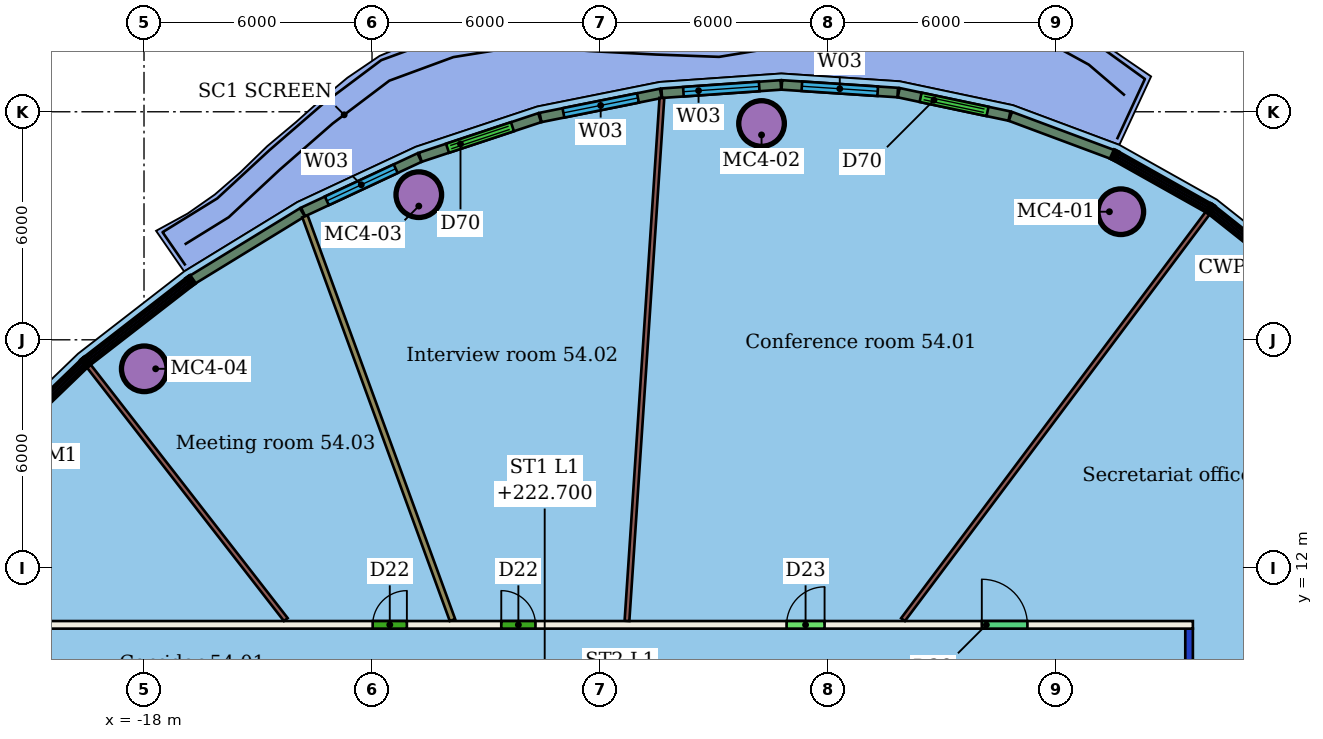
"""IFC4 building model, lengths in metres.
Left out: names, types, materials, properties, quantities, classifications, styles, units other than length and angle.
Written with IfcOpenShell. Run it as: python <this file> out.ifc"""

import sys

from ifc_helpers import new_model, si_unit, direction, frame, frame_2d, origin, origin_2d, place, context, subcontext, project, spatial, rectangle, hollow_circle, extrude, element, fill, save


model = new_model("IFC4")
c1 = context("Model", 3, precision=1e-05, world=origin(), true_north=direction((0.0, 1.0)))
c2 = subcontext(c1, "Body", "Model", "MODEL_VIEW")
j1 = project(units=[si_unit("LENGTHUNIT", "METRE"), si_unit("PLANEANGLEUNIT", "RADIAN")], contexts=[c1])
p1 = place(None, origin())
s1 = spatial("IfcSite", under=j1, at=p1, CompositionType="ELEMENT")
p2 = place(p1, origin())
s2 = spatial("IfcBuilding", under=s1, at=p2, CompositionType="ELEMENT")
p3 = place(p2, frame((0.0, 0.0, 220.9)))
s3 = spatial("IfcBuildingStorey", under=s2, at=p3, CompositionType="ELEMENT", Elevation=220.9)
for number, where, z_axis, x_axis in (
    (1, (7.704, 21.37, 0.0), (0.0, 0.0, 1.0), (1.0, 0.0, 0.0)),
    (2, (-1.75, 23.691, 0.0), (0.0, 0.0, 1.0), (1.0, 0.0, 0.0)),
    (3, (-10.769, 21.819, 0.0), (0.0, 0.0, 1.0), (1.0, 0.0, 0.0)),
    (4, (-17.993, 17.237, 0.0), (0.0, 0.0, 1.0), (1.0, 0.0, 0.0)),
):
    element("IfcColumn", number, at=place(p3, frame(where, z_axis=z_axis, x_axis=x_axis)), inside=s3, PredefinedType="COLUMN", context=c2, shape_type="SweptSolid", body=[
        extrude(hollow_circle(Radius=0.6, WallThickness=0.045, at=origin_2d()), origin(), (0.0, 0.0, 1.0), 3.45),
    ])
p4 = place(p3, frame((-21.6, 10.5, 0.0), z_axis=(0.0, 0.0, 1.0), x_axis=(1.0, 0.0, 0.0)))
e5 = element("IfcWall", 5, at=p4, inside=s3, PredefinedType="PARTITIONING", context=c2, shape_type="SweptSolid", body=[
    extrude(rectangle(XDim=31.2, YDim=0.2, at=frame_2d((15.6, 0.0))), origin(), (0.0, 0.0, 1.0), 3.45),
])
p5 = place(p4, frame((20.509, 0.0, 0.0)))
e6 = element("IfcOpeningElement", 6, at=p5, cuts=e5, PredefinedType="OPENING", context=c2, shape_type="SweptSolid", body=[
    extrude(rectangle(XDim=1.0, YDim=2.4, at=frame_2d((0.5, 1.2))), frame((0.0, 0.11, 0.0), z_axis=(0.0, -1.0, 0.0), x_axis=(1.0, 0.0, 0.0)), (0.0, 0.0, 1.0), 0.22),
])
p6 = place(p4, frame((13.001, 0.0, 0.0)))
e7 = element("IfcOpeningElement", 7, at=p6, cuts=e5, PredefinedType="OPENING", context=c2, shape_type="SweptSolid", body=[
    extrude(rectangle(XDim=0.9, YDim=2.1, at=frame_2d((0.45, 1.05))), frame((0.0, 0.11, 0.0), z_axis=(0.0, -1.0, 0.0), x_axis=(1.0, 0.0, 0.0)), (0.0, 0.0, 1.0), 0.22),
])
p7 = place(p4, frame((9.617, 0.0, 0.0)))
e8 = element("IfcOpeningElement", 8, at=p7, cuts=e5, PredefinedType="OPENING", context=c2, shape_type="SweptSolid", body=[
    extrude(rectangle(XDim=0.9, YDim=2.1, at=frame_2d((0.45, 1.05))), frame((0.0, 0.11, 0.0), z_axis=(0.0, -1.0, 0.0), x_axis=(1.0, 0.0, 0.0)), (0.0, 0.0, 1.0), 0.22),
])
p8 = place(p4, frame((25.646, 0.0, 0.0)))
e9 = element("IfcOpeningElement", 9, at=p8, cuts=e5, PredefinedType="OPENING", context=c2, shape_type="SweptSolid", body=[
    extrude(rectangle(XDim=1.2, YDim=2.4, at=frame_2d((0.6, 1.2))), frame((0.0, 0.11, 0.0), z_axis=(0.0, -1.0, 0.0), x_axis=(1.0, 0.0, 0.0)), (0.0, 0.0, 1.0), 0.22),
])
p9 = place(p3, frame((9.5, 10.4, 0.0), z_axis=(0.0, 0.0, 1.0), x_axis=(0.0, -1.0, 0.0)))
e10 = element("IfcWall", 10, at=p9, inside=s3, PredefinedType="PARTITIONING", context=c2, shape_type="SweptSolid", body=[
    extrude(rectangle(XDim=20.8, YDim=0.2, at=frame_2d((10.4, 0.0))), origin(), (0.0, 0.0, 1.0), 3.05),
])
p10 = place(p9, frame((14.609, 0.0, 0.0)))
e11 = element("IfcOpeningElement", 11, at=p10, cuts=e10, PredefinedType="OPENING", context=c2, shape_type="SweptSolid", body=[
    extrude(rectangle(XDim=0.9, YDim=2.1, at=frame_2d((0.45, 1.05))), frame((0.0, 0.11, 0.0), z_axis=(0.0, -1.0, 0.0), x_axis=(1.0, 0.0, 0.0)), (0.0, 0.0, 1.0), 0.22),
])
p11 = place(p9, frame((6.585, 0.0, 0.0)))
e12 = element("IfcOpeningElement", 12, at=p11, cuts=e10, PredefinedType="OPENING", context=c2, shape_type="SweptSolid", body=[
    extrude(rectangle(XDim=1.5, YDim=2.1, at=frame_2d((0.75, 1.05))), frame((0.0, 0.11, 0.0), z_axis=(0.0, -1.0, 0.0), x_axis=(1.0, 0.0, 0.0)), (0.0, 0.0, 1.0), 0.22),
])
p12 = place(p3, frame((9.991, 21.337, 0.0), z_axis=(0.0, 0.0, 1.0), x_axis=(-0.599716591432, -0.800212478009, 0.0)))
e13 = element("IfcWall", 13, at=p12, inside=s3, PredefinedType="PARTITIONING", context=c2, shape_type="SweptSolid", body=[
    extrude(rectangle(XDim=13.371, YDim=0.125, at=frame_2d((6.686, 0.0))), origin(), (0.0, 0.0, 1.0), 3.45),
])
p13 = place(p3, frame((-4.372, 24.363, 0.0), z_axis=(0.0, 0.0, 1.0), x_axis=(-0.066675295354, -0.997774726574, 0.0)))
e14 = element("IfcWall", 14, at=p13, inside=s3, PredefinedType="PARTITIONING", context=c2, shape_type="SweptSolid", body=[
    extrude(rectangle(XDim=13.79, YDim=0.125, at=frame_2d((6.895, 0.0))), origin(), (0.0, 0.0, 1.0), 3.45),
])
p14 = place(p3, frame((-13.765, 21.249, 0.0), z_axis=(0.0, 0.0, 1.0), x_axis=(0.34323140515, -0.939250873046, 0.0)))
e15 = element("IfcWall", 15, at=p14, inside=s3, PredefinedType="PARTITIONING", context=c2, shape_type="SweptSolid", body=[
    extrude(rectangle(XDim=11.31, YDim=0.15, at=frame_2d((5.655, 0.0))), origin(), (0.0, 0.0, 1.0), 3.45),
])
p15 = place(p3, frame((-19.457, 17.314, 0.0), z_axis=(0.0, 0.0, 1.0), x_axis=(0.613674696521, -0.789558969837, 0.0)))
e16 = element("IfcWall", 16, at=p15, inside=s3, PredefinedType="PARTITIONING", context=c2, shape_type="SweptSolid", body=[
    extrude(rectangle(XDim=8.455, YDim=0.125, at=frame_2d((4.228, 0.0))), origin(), (0.0, 0.0, 1.0), 3.45),
])
p16 = place(p3, frame((16.939, 12.415, 0.0), z_axis=(0.0, 0.0, 1.0), x_axis=(-0.879463626067, -0.47596610218, 0.0)))
e17 = element("IfcWall", 17, at=p16, inside=s3, PredefinedType="PARTITIONING", context=c2, shape_type="SweptSolid", body=[
    extrude(rectangle(XDim=8.311, YDim=0.125, at=frame_2d((4.156, 0.0))), origin(), (0.0, 0.0, 1.0), 3.45),
])
p17 = place(p3, frame((7.488, 22.876, 0.0), z_axis=(0.0, 0.0, 1.0), x_axis=(-0.936925456517, 0.34952923902, 0.0)))
e18 = element("IfcWall", 18, at=p17, inside=s3, PredefinedType="SOLIDWALL", context=c2, shape_type="SweptSolid", body=[
    extrude(rectangle(XDim=2.871, YDim=0.25, at=frame_2d((1.436, 0.0))), origin(), (0.0, 0.0, 1.0), 3.1),
])
p18 = place(p3, frame((4.773, 23.887, 0.0), z_axis=(0.0, 0.0, 1.0), x_axis=(-0.978444408338, 0.206510386645, 0.0)))
e19 = element("IfcWall", 19, at=p18, inside=s3, PredefinedType="SOLIDWALL", context=c2, shape_type="SweptSolid", body=[
    extrude(rectangle(XDim=2.978, YDim=0.25, at=frame_2d((1.489, 0.0))), origin(), (0.0, 0.0, 1.0), 3.1),
])
p19 = place(p18, frame((0.589, 0.0, 0.0)))
e20 = element("IfcOpeningElement", 20, at=p19, cuts=e19, PredefinedType="OPENING", context=c2, shape_type="SweptSolid", body=[
    extrude(rectangle(XDim=1.8, YDim=2.4, at=frame_2d((0.9, 1.2))), frame((0.0, 0.135, 0.0), z_axis=(0.0, -1.0, 0.0), x_axis=(1.0, 0.0, 0.0)), (0.0, 0.0, 1.0), 0.27),
])
p20 = place(p3, frame((1.833, 24.506, 0.0), z_axis=(0.0, 0.0, 1.0), x_axis=(-0.997842734826, 0.065649650074, 0.0)))
e21 = element("IfcWall", 21, at=p20, inside=s3, PredefinedType="SOLIDWALL", context=c2, shape_type="SweptSolid", body=[
    extrude(rectangle(XDim=3.057, YDim=0.25, at=frame_2d((1.528, 0.0))), origin(), (0.0, 0.0, 1.0), 3.1),
])
p21 = place(p20, frame((0.529, 0.0, 0.9)))
e22 = element("IfcOpeningElement", 22, at=p21, cuts=e21, PredefinedType="OPENING", context=c2, shape_type="SweptSolid", body=[
    extrude(rectangle(XDim=2.0, YDim=2.1, at=frame_2d((1.0, 1.05))), frame((0.0, 0.135, 0.0), z_axis=(0.0, -1.0, 0.0), x_axis=(1.0, 0.0, 0.0)), (0.0, 0.0, 1.0), 0.27),
])
p22 = place(p3, frame((-1.242, 24.706, 0.0), z_axis=(0.0, 0.0, 1.0), x_axis=(-0.997585250628, -0.069452629395, 0.0)))
e23 = element("IfcWall", 23, at=p22, inside=s3, PredefinedType="SOLIDWALL", context=c2, shape_type="SweptSolid", body=[
    extrude(rectangle(XDim=3.143, YDim=0.25, at=frame_2d((1.571, 0.0))), origin(), (0.0, 0.0, 1.0), 3.1),
])
p23 = place(p22, frame((0.571, 0.0, 0.9)))
e24 = element("IfcOpeningElement", 24, at=p23, cuts=e23, PredefinedType="OPENING", context=c2, shape_type="SweptSolid", body=[
    extrude(rectangle(XDim=2.0, YDim=2.1, at=frame_2d((1.0, 1.05))), frame((0.0, 0.135, 0.0), z_axis=(0.0, -1.0, 0.0), x_axis=(1.0, 0.0, 0.0)), (0.0, 0.0, 1.0), 0.27),
])
p24 = place(p3, frame((-4.4, 24.485, 0.0), z_axis=(0.0, 0.0, 1.0), x_axis=(-0.980484586875, -0.19659596868, 0.0)))
e25 = element("IfcWall", 25, at=p24, inside=s3, PredefinedType="SOLIDWALL", context=c2, shape_type="SweptSolid", body=[
    extrude(rectangle(XDim=3.229, YDim=0.25, at=frame_2d((1.614, 0.0))), origin(), (0.0, 0.0, 1.0), 3.1),
])
p25 = place(p24, frame((0.614, 0.0, 0.9)))
e26 = element("IfcOpeningElement", 26, at=p25, cuts=e25, PredefinedType="OPENING", context=c2, shape_type="SweptSolid", body=[
    extrude(rectangle(XDim=2.0, YDim=2.1, at=frame_2d((1.0, 1.05))), frame((0.0, 0.135, 0.0), z_axis=(0.0, -1.0, 0.0), x_axis=(1.0, 0.0, 0.0)), (0.0, 0.0, 1.0), 0.27),
])
p26 = place(p3, frame((-7.589, 23.844, 0.0), z_axis=(0.0, 0.0, 1.0), x_axis=(-0.949220414117, -0.314611832935, 0.0)))
e27 = element("IfcWall", 27, at=p26, inside=s3, PredefinedType="SOLIDWALL", context=c2, shape_type="SweptSolid", body=[
    extrude(rectangle(XDim=3.31, YDim=0.25, at=frame_2d((1.655, 0.0))), origin(), (0.0, 0.0, 1.0), 3.1),
])
p27 = place(p26, frame((0.755, 0.0, 0.0)))
e28 = element("IfcOpeningElement", 28, at=p27, cuts=e27, PredefinedType="OPENING", context=c2, shape_type="SweptSolid", body=[
    extrude(rectangle(XDim=1.8, YDim=2.4, at=frame_2d((0.9, 1.2))), frame((0.0, 0.135, 0.0), z_axis=(0.0, -1.0, 0.0), x_axis=(1.0, 0.0, 0.0)), (0.0, 0.0, 1.0), 0.27),
])
p28 = place(p3, frame((-10.751, 22.794, 0.0), z_axis=(0.0, 0.0, 1.0), x_axis=(-0.906026245015, -0.42322150624, 0.0)))
e29 = element("IfcWall", 29, at=p28, inside=s3, PredefinedType="SOLIDWALL", context=c2, shape_type="SweptSolid", body=[
    extrude(rectangle(XDim=3.38, YDim=0.25, at=frame_2d((1.69, 0.0))), origin(), (0.0, 0.0, 1.0), 3.1),
])
p29 = place(p28, frame((0.69, 0.0, 0.9)))
e30 = element("IfcOpeningElement", 30, at=p29, cuts=e29, PredefinedType="OPENING", context=c2, shape_type="SweptSolid", body=[
    extrude(rectangle(XDim=2.0, YDim=2.1, at=frame_2d((1.0, 1.05))), frame((0.0, 0.135, 0.0), z_axis=(0.0, -1.0, 0.0), x_axis=(1.0, 0.0, 0.0)), (0.0, 0.0, 1.0), 0.27),
])
p30 = place(p3, frame((-13.833, 21.353, 0.0), z_axis=(0.0, 0.0, 1.0), x_axis=(-0.852681900505, -0.522430451402, 0.0)))
e31 = element("IfcWall", 31, at=p30, inside=s3, PredefinedType="SOLIDWALL", context=c2, shape_type="SweptSolid", body=[
    extrude(rectangle(XDim=3.393, YDim=0.25, at=frame_2d((1.697, 0.0))), origin(), (0.0, 0.0, 1.0), 3.1),
])
p31 = place(p5, origin())
e32 = element("IfcDoor", 32, at=p31, inside=s3, OperationType="SINGLE_SWING_RIGHT", PredefinedType="DOOR", context=c2, shape_type="SweptSolid", body=[
    extrude(rectangle(XDim=1.0, YDim=2.4, at=frame_2d((0.5, 1.2))), frame((0.0, 0.025, 0.0), z_axis=(0.0, -1.0, 0.0), x_axis=(1.0, 0.0, 0.0)), (0.0, 0.0, 1.0), 0.05),
])
fill(e6, e32)
p32 = place(p6, origin())
e33 = element("IfcDoor", 33, at=p32, inside=s3, OperationType="SINGLE_SWING_LEFT", PredefinedType="DOOR", context=c2, shape_type="SweptSolid", body=[
    extrude(rectangle(XDim=0.9, YDim=2.1, at=frame_2d((0.45, 1.05))), frame((0.0, 0.025, 0.0), z_axis=(0.0, -1.0, 0.0), x_axis=(1.0, 0.0, 0.0)), (0.0, 0.0, 1.0), 0.05),
])
fill(e7, e33)
p33 = place(p7, origin())
e34 = element("IfcDoor", 34, at=p33, inside=s3, OperationType="SINGLE_SWING_RIGHT", PredefinedType="DOOR", context=c2, shape_type="SweptSolid", body=[
    extrude(rectangle(XDim=0.9, YDim=2.1, at=frame_2d((0.45, 1.05))), frame((0.0, 0.025, 0.0), z_axis=(0.0, -1.0, 0.0), x_axis=(1.0, 0.0, 0.0)), (0.0, 0.0, 1.0), 0.05),
])
fill(e8, e34)
p34 = place(p8, origin())
e35 = element("IfcDoor", 35, at=p34, inside=s3, OperationType="SINGLE_SWING_LEFT", PredefinedType="DOOR", context=c2, shape_type="SweptSolid", body=[
    extrude(rectangle(XDim=1.2, YDim=2.4, at=frame_2d((0.6, 1.2))), frame((0.0, 0.025, 0.0), z_axis=(0.0, -1.0, 0.0), x_axis=(1.0, 0.0, 0.0)), (0.0, 0.0, 1.0), 0.05),
])
fill(e9, e35)
p35 = place(p19, origin())
e36 = element("IfcDoor", 36, at=p35, inside=s3, OperationType="DOUBLE_DOOR_SLIDING", PredefinedType="DOOR", context=c2, shape_type="SweptSolid", body=[
    extrude(rectangle(XDim=1.8, YDim=2.4, at=frame_2d((0.9, 1.2))), frame((0.0, 0.025, 0.0), z_axis=(0.0, -1.0, 0.0), x_axis=(1.0, 0.0, 0.0)), (0.0, 0.0, 1.0), 0.05),
])
fill(e20, e36)
p36 = place(p21, origin())
e37 = element("IfcWindow", 37, at=p36, inside=s3, PartitioningType="SINGLE_PANEL", PredefinedType="WINDOW", context=c2, shape_type="SweptSolid", body=[
    extrude(rectangle(XDim=2.0, YDim=2.1, at=frame_2d((1.0, 1.05))), frame((0.0, 0.03, 0.0), z_axis=(0.0, -1.0, 0.0), x_axis=(1.0, 0.0, 0.0)), (0.0, 0.0, 1.0), 0.06),
])
fill(e22, e37)
p37 = place(p23, origin())
e38 = element("IfcWindow", 38, at=p37, inside=s3, PartitioningType="SINGLE_PANEL", PredefinedType="WINDOW", context=c2, shape_type="SweptSolid", body=[
    extrude(rectangle(XDim=2.0, YDim=2.1, at=frame_2d((1.0, 1.05))), frame((0.0, 0.03, 0.0), z_axis=(0.0, -1.0, 0.0), x_axis=(1.0, 0.0, 0.0)), (0.0, 0.0, 1.0), 0.06),
])
fill(e24, e38)
p38 = place(p25, origin())
e39 = element("IfcWindow", 39, at=p38, inside=s3, PartitioningType="SINGLE_PANEL", PredefinedType="WINDOW", context=c2, shape_type="SweptSolid", body=[
    extrude(rectangle(XDim=2.0, YDim=2.1, at=frame_2d((1.0, 1.05))), frame((0.0, 0.03, 0.0), z_axis=(0.0, -1.0, 0.0), x_axis=(1.0, 0.0, 0.0)), (0.0, 0.0, 1.0), 0.06),
])
fill(e26, e39)
p39 = place(p27, origin())
e40 = element("IfcDoor", 40, at=p39, inside=s3, OperationType="DOUBLE_DOOR_SLIDING", PredefinedType="DOOR", context=c2, shape_type="SweptSolid", body=[
    extrude(rectangle(XDim=1.8, YDim=2.4, at=frame_2d((0.9, 1.2))), frame((0.0, 0.025, 0.0), z_axis=(0.0, -1.0, 0.0), x_axis=(1.0, 0.0, 0.0)), (0.0, 0.0, 1.0), 0.05),
])
fill(e28, e40)
p40 = place(p29, origin())
e41 = element("IfcWindow", 41, at=p40, inside=s3, PartitioningType="SINGLE_PANEL", PredefinedType="WINDOW", context=c2, shape_type="SweptSolid", body=[
    extrude(rectangle(XDim=2.0, YDim=2.1, at=frame_2d((1.0, 1.05))), frame((0.0, 0.03, 0.0), z_axis=(0.0, -1.0, 0.0), x_axis=(1.0, 0.0, 0.0)), (0.0, 0.0, 1.0), 0.06),
])
fill(e30, e41)
save(model, sys.argv[1])
